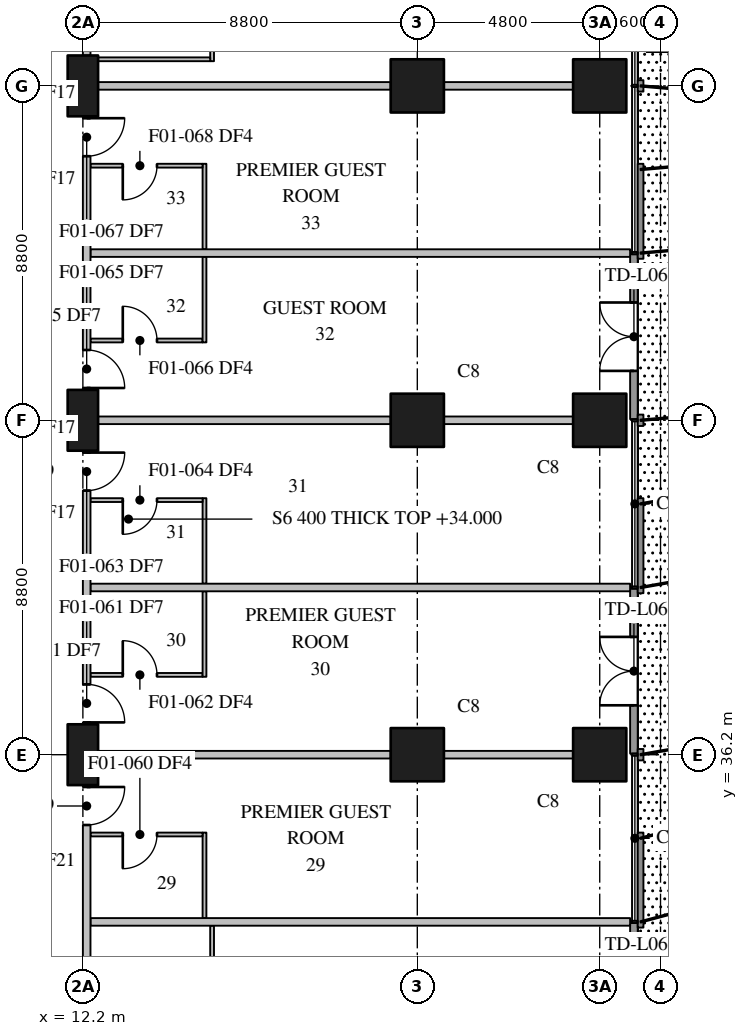
"""IFC4 building model, lengths in metres.
Left out: names, types, materials, properties, quantities, classifications, styles, units other than length and angle.
Written with IfcOpenShell. Run it as: python <this file> out.ifc"""

import sys

from ifc_helpers import new_model, si_unit, direction, frame, frame_2d, origin, origin_2d, place, context, subcontext, project, spatial, rectangle, extrude, element, fill, save


model = new_model("IFC4")
c1 = context("Model", 3, precision=1e-05, world=origin(), true_north=direction((0.0, 1.0)))
c2 = subcontext(c1, "Body", "Model", "MODEL_VIEW")
j1 = project(units=[si_unit("LENGTHUNIT", "METRE"), si_unit("PLANEANGLEUNIT", "RADIAN")], contexts=[c1])
p1 = place(None, origin())
s1 = spatial("IfcSite", under=j1, at=p1, CompositionType="ELEMENT")
p2 = place(p1, origin())
s2 = spatial("IfcBuilding", under=s1, at=p2, CompositionType="ELEMENT")
p3 = place(p2, frame((0.0, 0.0, 34.0)))
s3 = spatial("IfcBuildingStorey", under=s2, at=p3, CompositionType="ELEMENT", Elevation=34.0)
for number, where, z_axis, x_axis in (
    (1, (12.2, 36.2, 0.0), (0.0, 0.0, 1.0), (0.0, 1.0, 0.0)),
    (2, (12.2, 45.0, 0.0), (0.0, 0.0, 1.0), (0.0, 1.0, 0.0)),
    (3, (12.2, 53.8, 0.0), (0.0, 0.0, 1.0), (0.0, 1.0, 0.0)),
):
    element("IfcColumn", number, at=place(p3, frame(where, z_axis=z_axis, x_axis=x_axis)), inside=s3, PredefinedType="COLUMN", context=c2, shape_type="SweptSolid", body=[
        extrude(rectangle(XDim=1.6, YDim=0.8, at=origin_2d()), origin(), (0.0, 0.0, 1.0), 3.7),
    ])
for number, where, z_axis, x_axis in (
    (4, (21.0, 36.2, 0.0), (0.0, 0.0, 1.0), (1.0, 0.0, 0.0)),
    (5, (21.0, 45.0, 0.0), (0.0, 0.0, 1.0), (1.0, 0.0, 0.0)),
    (6, (21.0, 53.8, 0.0), (0.0, 0.0, 1.0), (1.0, 0.0, 0.0)),
    (7, (25.8, 36.2, 0.0), (0.0, 0.0, 1.0), (1.0, 0.0, 0.0)),
    (8, (25.8, 45.0, 0.0), (0.0, 0.0, 1.0), (1.0, 0.0, 0.0)),
    (9, (25.8, 53.8, 0.0), (0.0, 0.0, 1.0), (1.0, 0.0, 0.0)),
):
    element("IfcColumn", number, at=place(p3, frame(where, z_axis=z_axis, x_axis=x_axis)), inside=s3, PredefinedType="COLUMN", context=c2, shape_type="SweptSolid", body=[
        extrude(rectangle(XDim=1.4, YDim=1.4, at=origin_2d()), origin(), (0.0, 0.0, 1.0), 3.7),
    ])
p4 = place(p3, frame((26.7, 27.43, 0.0), z_axis=(0.0, 0.0, 1.0), x_axis=(0.0, 1.0, 0.0)))
e10 = element("IfcWall", 10, at=p4, inside=s3, PredefinedType="STANDARD", context=c2, shape_type="SweptSolid", body=[
    extrude(rectangle(XDim=4.34, YDim=0.2, at=frame_2d((2.17, 0.0))), origin(), (0.0, 0.0, 1.0), 3.4),
])
p5 = place(p4, frame((1.27, 0.0, 0.0)))
e11 = element("IfcOpeningElement", 11, at=p5, cuts=e10, PredefinedType="OPENING", context=c2, shape_type="SweptSolid", body=[
    extrude(rectangle(XDim=1.8, YDim=2.4, at=frame_2d((0.9, 1.2))), frame((0.0, 0.11, 0.0), z_axis=(0.0, -1.0, 0.0), x_axis=(1.0, 0.0, 0.0)), (0.0, 0.0, 1.0), 0.22),
])
p6 = place(p3, frame((26.7, 36.23, 0.0), z_axis=(0.0, 0.0, 1.0), x_axis=(0.0, 1.0, 0.0)))
e12 = element("IfcWall", 12, at=p6, inside=s3, PredefinedType="STANDARD", context=c2, shape_type="SweptSolid", body=[
    extrude(rectangle(XDim=4.34, YDim=0.2, at=frame_2d((2.17, 0.0))), origin(), (0.0, 0.0, 1.0), 3.4),
])
p7 = place(p6, frame((1.27, 0.0, 0.0)))
e13 = element("IfcOpeningElement", 13, at=p7, cuts=e12, PredefinedType="OPENING", context=c2, shape_type="SweptSolid", body=[
    extrude(rectangle(XDim=1.8, YDim=2.4, at=frame_2d((0.9, 1.2))), frame((0.0, 0.11, 0.0), z_axis=(0.0, -1.0, 0.0), x_axis=(1.0, 0.0, 0.0)), (0.0, 0.0, 1.0), 0.22),
])
p8 = place(p3, frame((26.7, 45.03, 0.0), z_axis=(0.0, 0.0, 1.0), x_axis=(0.0, 1.0, 0.0)))
e14 = element("IfcWall", 14, at=p8, inside=s3, PredefinedType="STANDARD", context=c2, shape_type="SweptSolid", body=[
    extrude(rectangle(XDim=4.34, YDim=0.2, at=frame_2d((2.17, 0.0))), origin(), (0.0, 0.0, 1.0), 3.4),
])
p9 = place(p8, frame((1.27, 0.0, 0.0)))
e15 = element("IfcOpeningElement", 15, at=p9, cuts=e14, PredefinedType="OPENING", context=c2, shape_type="SweptSolid", body=[
    extrude(rectangle(XDim=1.8, YDim=2.4, at=frame_2d((0.9, 1.2))), frame((0.0, 0.11, 0.0), z_axis=(0.0, -1.0, 0.0), x_axis=(1.0, 0.0, 0.0)), (0.0, 0.0, 1.0), 0.22),
])
p10 = place(p3, frame((12.6, 36.2, 0.0), z_axis=(0.0, 0.0, 1.0), x_axis=(1.0, 0.0, 0.0)))
e16 = element("IfcWall", 16, at=p10, inside=s3, PredefinedType="PARTITIONING", context=c2, shape_type="SweptSolid", body=[
    extrude(rectangle(XDim=7.7, YDim=0.2, at=frame_2d((3.85, 0.0))), origin(), (0.0, 0.0, 1.0), 3.4),
])
p11 = place(p3, frame((21.7, 36.2, 0.0), z_axis=(0.0, 0.0, 1.0), x_axis=(1.0, 0.0, 0.0)))
e17 = element("IfcWall", 17, at=p11, inside=s3, PredefinedType="PARTITIONING", context=c2, shape_type="SweptSolid", body=[
    extrude(rectangle(XDim=3.4, YDim=0.2, at=frame_2d((1.7, 0.0))), origin(), (0.0, 0.0, 1.0), 3.4),
])
p12 = place(p3, frame((12.4, 40.6, 0.0), z_axis=(0.0, 0.0, 1.0), x_axis=(1.0, 0.0, 0.0)))
e18 = element("IfcWall", 18, at=p12, inside=s3, PredefinedType="PARTITIONING", context=c2, shape_type="SweptSolid", body=[
    extrude(rectangle(XDim=14.2, YDim=0.2, at=frame_2d((7.1, 0.0))), origin(), (0.0, 0.0, 1.0), 3.4),
])
p13 = place(p3, frame((12.6, 45.0, 0.0), z_axis=(0.0, 0.0, 1.0), x_axis=(1.0, 0.0, 0.0)))
e19 = element("IfcWall", 19, at=p13, inside=s3, PredefinedType="PARTITIONING", context=c2, shape_type="SweptSolid", body=[
    extrude(rectangle(XDim=7.7, YDim=0.2, at=frame_2d((3.85, 0.0))), origin(), (0.0, 0.0, 1.0), 3.4),
])
p14 = place(p3, frame((21.7, 45.0, 0.0), z_axis=(0.0, 0.0, 1.0), x_axis=(1.0, 0.0, 0.0)))
e20 = element("IfcWall", 20, at=p14, inside=s3, PredefinedType="PARTITIONING", context=c2, shape_type="SweptSolid", body=[
    extrude(rectangle(XDim=3.4, YDim=0.2, at=frame_2d((1.7, 0.0))), origin(), (0.0, 0.0, 1.0), 3.4),
])
p15 = place(p3, frame((12.4, 49.4, 0.0), z_axis=(0.0, 0.0, 1.0), x_axis=(1.0, 0.0, 0.0)))
e21 = element("IfcWall", 21, at=p15, inside=s3, PredefinedType="PARTITIONING", context=c2, shape_type="SweptSolid", body=[
    extrude(rectangle(XDim=14.2, YDim=0.2, at=frame_2d((7.1, 0.0))), origin(), (0.0, 0.0, 1.0), 3.4),
])
p16 = place(p3, frame((12.6, 53.8, 0.0), z_axis=(0.0, 0.0, 1.0), x_axis=(1.0, 0.0, 0.0)))
e22 = element("IfcWall", 22, at=p16, inside=s3, PredefinedType="PARTITIONING", context=c2, shape_type="SweptSolid", body=[
    extrude(rectangle(XDim=7.7, YDim=0.2, at=frame_2d((3.85, 0.0))), origin(), (0.0, 0.0, 1.0), 3.4),
])
p17 = place(p3, frame((21.7, 53.8, 0.0), z_axis=(0.0, 0.0, 1.0), x_axis=(1.0, 0.0, 0.0)))
e23 = element("IfcWall", 23, at=p17, inside=s3, PredefinedType="PARTITIONING", context=c2, shape_type="SweptSolid", body=[
    extrude(rectangle(XDim=3.4, YDim=0.2, at=frame_2d((1.7, 0.0))), origin(), (0.0, 0.0, 1.0), 3.4),
])
p18 = place(p3, frame((12.3, 35.4, 0.0), z_axis=(0.0, 0.0, 1.0), x_axis=(0.0, -1.0, 0.0)))
e24 = element("IfcWall", 24, at=p18, inside=s3, PredefinedType="PARTITIONING", context=c2, shape_type="SweptSolid", body=[
    extrude(rectangle(XDim=7.2, YDim=0.2, at=frame_2d((3.6, 0.0))), origin(), (0.0, 0.0, 1.0), 3.4),
])
p19 = place(p18, frame((0.05, 0.0, 0.0)))
e25 = element("IfcOpeningElement", 25, at=p19, cuts=e24, PredefinedType="OPENING", context=c2, shape_type="SweptSolid", body=[
    extrude(rectangle(XDim=1.0, YDim=2.1, at=frame_2d((0.5, 1.05))), frame((0.0, 0.11, 0.0), z_axis=(0.0, -1.0, 0.0), x_axis=(1.0, 0.0, 0.0)), (0.0, 0.0, 1.0), 0.22),
])
p20 = place(p3, frame((12.3, 44.2, 0.0), z_axis=(0.0, 0.0, 1.0), x_axis=(0.0, -1.0, 0.0)))
e26 = element("IfcWall", 26, at=p20, inside=s3, PredefinedType="PARTITIONING", context=c2, shape_type="SweptSolid", body=[
    extrude(rectangle(XDim=7.2, YDim=0.2, at=frame_2d((3.6, 0.0))), origin(), (0.0, 0.0, 1.0), 3.4),
])
p21 = place(p20, frame((6.15, 0.0, 0.0)))
e27 = element("IfcOpeningElement", 27, at=p21, cuts=e26, PredefinedType="OPENING", context=c2, shape_type="SweptSolid", body=[
    extrude(rectangle(XDim=1.0, YDim=2.1, at=frame_2d((0.5, 1.05))), frame((0.0, 0.11, 0.0), z_axis=(0.0, -1.0, 0.0), x_axis=(1.0, 0.0, 0.0)), (0.0, 0.0, 1.0), 0.22),
])
p22 = place(p20, frame((0.05, 0.0, 0.0)))
e28 = element("IfcOpeningElement", 28, at=p22, cuts=e26, PredefinedType="OPENING", context=c2, shape_type="SweptSolid", body=[
    extrude(rectangle(XDim=1.0, YDim=2.1, at=frame_2d((0.5, 1.05))), frame((0.0, 0.11, 0.0), z_axis=(0.0, -1.0, 0.0), x_axis=(1.0, 0.0, 0.0)), (0.0, 0.0, 1.0), 0.22),
])
p23 = place(p3, frame((12.3, 53.0, 0.0), z_axis=(0.0, 0.0, 1.0), x_axis=(0.0, -1.0, 0.0)))
e29 = element("IfcWall", 29, at=p23, inside=s3, PredefinedType="PARTITIONING", context=c2, shape_type="SweptSolid", body=[
    extrude(rectangle(XDim=7.2, YDim=0.2, at=frame_2d((3.6, 0.0))), origin(), (0.0, 0.0, 1.0), 3.4),
])
p24 = place(p23, frame((6.15, 0.0, 0.0)))
e30 = element("IfcOpeningElement", 30, at=p24, cuts=e29, PredefinedType="OPENING", context=c2, shape_type="SweptSolid", body=[
    extrude(rectangle(XDim=1.0, YDim=2.1, at=frame_2d((0.5, 1.05))), frame((0.0, 0.11, 0.0), z_axis=(0.0, -1.0, 0.0), x_axis=(1.0, 0.0, 0.0)), (0.0, 0.0, 1.0), 0.22),
])
p25 = place(p23, frame((0.05, 0.0, 0.0)))
e31 = element("IfcOpeningElement", 31, at=p25, cuts=e29, PredefinedType="OPENING", context=c2, shape_type="SweptSolid", body=[
    extrude(rectangle(XDim=1.0, YDim=2.1, at=frame_2d((0.5, 1.05))), frame((0.0, 0.11, 0.0), z_axis=(0.0, -1.0, 0.0), x_axis=(1.0, 0.0, 0.0)), (0.0, 0.0, 1.0), 0.22),
])
p26 = place(p3, frame((12.3, 61.8, 0.0), z_axis=(0.0, 0.0, 1.0), x_axis=(0.0, -1.0, 0.0)))
e32 = element("IfcWall", 32, at=p26, inside=s3, PredefinedType="PARTITIONING", context=c2, shape_type="SweptSolid", body=[
    extrude(rectangle(XDim=7.2, YDim=0.2, at=frame_2d((3.6, 0.0))), origin(), (0.0, 0.0, 1.0), 3.4),
])
p27 = place(p26, frame((0.5, 0.0, 0.0)))
e33 = element("IfcOpeningElement", 33, at=p27, cuts=e32, PredefinedType="OPENING", context=c2, shape_type="SweptSolid", body=[
    extrude(rectangle(XDim=1.1, YDim=2.1, at=frame_2d((0.55, 1.05))), frame((0.0, 0.11, 0.0), z_axis=(0.0, -1.0, 0.0), x_axis=(1.0, 0.0, 0.0)), (0.0, 0.0, 1.0), 0.22),
])
p28 = place(p3, frame((12.4, 31.8, 0.0), z_axis=(0.0, 0.0, 1.0), x_axis=(1.0, 0.0, 0.0)))
e34 = element("IfcWall", 34, at=p28, inside=s3, PredefinedType="PARTITIONING", context=c2, shape_type="SweptSolid", body=[
    extrude(rectangle(XDim=14.2, YDim=0.2, at=frame_2d((7.1, 0.0))), origin(), (0.0, 0.0, 1.0), 3.4),
])
p29 = place(p3, frame((12.4, 38.3, 0.0), z_axis=(0.0, 0.0, 1.0), x_axis=(1.0, 0.0, 0.0)))
e35 = element("IfcWall", 35, at=p29, inside=s3, PredefinedType="PARTITIONING", context=c2, shape_type="SweptSolid", body=[
    extrude(rectangle(XDim=2.95, YDim=0.1, at=frame_2d((1.475, 0.0))), origin(), (0.0, 0.0, 1.0), 3.4),
])
p30 = place(p29, frame((0.85, 0.0, 0.0)))
e36 = element("IfcOpeningElement", 36, at=p30, cuts=e35, PredefinedType="OPENING", context=c2, shape_type="SweptSolid", body=[
    extrude(rectangle(XDim=0.9, YDim=2.1, at=frame_2d((0.45, 1.05))), frame((0.0, 0.06, 0.0), z_axis=(0.0, -1.0, 0.0), x_axis=(1.0, 0.0, 0.0)), (0.0, 0.0, 1.0), 0.12),
])
p31 = place(p3, frame((12.4, 47.1, 0.0), z_axis=(0.0, 0.0, 1.0), x_axis=(1.0, 0.0, 0.0)))
e37 = element("IfcWall", 37, at=p31, inside=s3, PredefinedType="PARTITIONING", context=c2, shape_type="SweptSolid", body=[
    extrude(rectangle(XDim=2.95, YDim=0.1, at=frame_2d((1.475, 0.0))), origin(), (0.0, 0.0, 1.0), 3.4),
])
p32 = place(p31, frame((0.85, 0.0, 0.0)))
e38 = element("IfcOpeningElement", 38, at=p32, cuts=e37, PredefinedType="OPENING", context=c2, shape_type="SweptSolid", body=[
    extrude(rectangle(XDim=0.9, YDim=2.1, at=frame_2d((0.45, 1.05))), frame((0.0, 0.06, 0.0), z_axis=(0.0, -1.0, 0.0), x_axis=(1.0, 0.0, 0.0)), (0.0, 0.0, 1.0), 0.12),
])
p33 = place(p3, frame((15.6, 28.15, 0.0), z_axis=(0.0, 0.0, 1.0), x_axis=(0.0, 1.0, 0.0)))
e39 = element("IfcWall", 39, at=p33, inside=s3, PredefinedType="PARTITIONING", context=c2, shape_type="SweptSolid", body=[
    extrude(rectangle(XDim=3.55, YDim=0.1, at=frame_2d((1.775, 0.0))), origin(), (0.0, 0.0, 1.0), 3.4),
])
p34 = place(p3, frame((15.6, 54.45, 0.0), z_axis=(0.0, 0.0, 1.0), x_axis=(0.0, 1.0, 0.0)))
e40 = element("IfcWall", 40, at=p34, inside=s3, PredefinedType="PARTITIONING", context=c2, shape_type="SweptSolid", body=[
    extrude(rectangle(XDim=3.7, YDim=0.1, at=frame_2d((1.85, 0.0))), origin(), (0.0, 0.0, 1.0), 3.4),
])
for number, where, z_axis, x_axis in (
    (41, (15.4, 31.9, 0.0), (0.0, 0.0, 1.0), (0.0, 1.0, 0.0)),
    (42, (15.4, 38.25, 0.0), (0.0, 0.0, 1.0), (0.0, 1.0, 0.0)),
    (43, (15.4, 40.7, 0.0), (0.0, 0.0, 1.0), (0.0, 1.0, 0.0)),
    (44, (15.4, 47.05, 0.0), (0.0, 0.0, 1.0), (0.0, 1.0, 0.0)),
    (45, (15.4, 49.5, 0.0), (0.0, 0.0, 1.0), (0.0, 1.0, 0.0)),
):
    element("IfcWall", number, at=place(p3, frame(where, z_axis=z_axis, x_axis=x_axis)), inside=s3, PredefinedType="PARTITIONING", context=c2, shape_type="SweptSolid", body=[
        extrude(rectangle(XDim=2.25, YDim=0.1, at=frame_2d((1.125, 0.0))), origin(), (0.0, 0.0, 1.0), 3.4),
    ])
p35 = place(p3, frame((15.35, 34.1, 0.0), z_axis=(0.0, 0.0, 1.0), x_axis=(-1.0, 0.0, 0.0)))
e46 = element("IfcWall", 46, at=p35, inside=s3, PredefinedType="PARTITIONING", context=c2, shape_type="SweptSolid", body=[
    extrude(rectangle(XDim=2.95, YDim=0.1, at=frame_2d((1.475, 0.0))), origin(), (0.0, 0.0, 1.0), 3.4),
])
p36 = place(p35, frame((1.2, 0.0, 0.0)))
e47 = element("IfcOpeningElement", 47, at=p36, cuts=e46, PredefinedType="OPENING", context=c2, shape_type="SweptSolid", body=[
    extrude(rectangle(XDim=0.9, YDim=2.1, at=frame_2d((0.45, 1.05))), frame((0.0, 0.06, 0.0), z_axis=(0.0, -1.0, 0.0), x_axis=(1.0, 0.0, 0.0)), (0.0, 0.0, 1.0), 0.12),
])
p37 = place(p3, frame((15.35, 42.9, 0.0), z_axis=(0.0, 0.0, 1.0), x_axis=(-1.0, 0.0, 0.0)))
e48 = element("IfcWall", 48, at=p37, inside=s3, PredefinedType="PARTITIONING", context=c2, shape_type="SweptSolid", body=[
    extrude(rectangle(XDim=2.95, YDim=0.1, at=frame_2d((1.475, 0.0))), origin(), (0.0, 0.0, 1.0), 3.4),
])
p38 = place(p37, frame((1.2, 0.0, 0.0)))
e49 = element("IfcOpeningElement", 49, at=p38, cuts=e48, PredefinedType="OPENING", context=c2, shape_type="SweptSolid", body=[
    extrude(rectangle(XDim=0.9, YDim=2.1, at=frame_2d((0.45, 1.05))), frame((0.0, 0.06, 0.0), z_axis=(0.0, -1.0, 0.0), x_axis=(1.0, 0.0, 0.0)), (0.0, 0.0, 1.0), 0.12),
])
p39 = place(p3, frame((15.35, 51.7, 0.0), z_axis=(0.0, 0.0, 1.0), x_axis=(-1.0, 0.0, 0.0)))
e50 = element("IfcWall", 50, at=p39, inside=s3, PredefinedType="PARTITIONING", context=c2, shape_type="SweptSolid", body=[
    extrude(rectangle(XDim=2.95, YDim=0.1, at=frame_2d((1.475, 0.0))), origin(), (0.0, 0.0, 1.0), 3.4),
])
p40 = place(p39, frame((1.2, 0.0, 0.0)))
e51 = element("IfcOpeningElement", 51, at=p40, cuts=e50, PredefinedType="OPENING", context=c2, shape_type="SweptSolid", body=[
    extrude(rectangle(XDim=0.9, YDim=2.1, at=frame_2d((0.45, 1.05))), frame((0.0, 0.06, 0.0), z_axis=(0.0, -1.0, 0.0), x_axis=(1.0, 0.0, 0.0)), (0.0, 0.0, 1.0), 0.12),
])
p41 = place(p3, frame((12.6, 54.5, 0.0), z_axis=(0.0, 0.0, 1.0), x_axis=(1.0, 0.0, 0.0)))
e52 = element("IfcWall", 52, at=p41, inside=s3, PredefinedType="PARTITIONING", context=c2, shape_type="SweptSolid", body=[
    extrude(rectangle(XDim=2.95, YDim=0.1, at=frame_2d((1.475, 0.0))), origin(), (0.0, 0.0, 1.0), 3.4),
])
p42 = place(p7, origin())
e53 = element("IfcDoor", 53, at=p42, inside=s3, OperationType="SINGLE_SWING_LEFT", PredefinedType="DOOR", context=c2, shape_type="SweptSolid", body=[
    extrude(rectangle(XDim=1.8, YDim=2.4, at=frame_2d((0.9, 1.2))), frame((0.0, 0.025, 0.0), z_axis=(0.0, -1.0, 0.0), x_axis=(1.0, 0.0, 0.0)), (0.0, 0.0, 1.0), 0.05),
])
fill(e13, e53)
p43 = place(p9, origin())
e54 = element("IfcDoor", 54, at=p43, inside=s3, OperationType="SINGLE_SWING_LEFT", PredefinedType="DOOR", context=c2, shape_type="SweptSolid", body=[
    extrude(rectangle(XDim=1.8, YDim=2.4, at=frame_2d((0.9, 1.2))), frame((0.0, 0.025, 0.0), z_axis=(0.0, -1.0, 0.0), x_axis=(1.0, 0.0, 0.0)), (0.0, 0.0, 1.0), 0.05),
])
fill(e15, e54)
p44 = place(p19, origin())
e55 = element("IfcDoor", 55, at=p44, inside=s3, OperationType="SINGLE_SWING_LEFT", PredefinedType="DOOR", context=c2, shape_type="SweptSolid", body=[
    extrude(rectangle(XDim=1.0, YDim=2.1, at=frame_2d((0.5, 1.05))), frame((0.0, 0.025, 0.0), z_axis=(0.0, -1.0, 0.0), x_axis=(1.0, 0.0, 0.0)), (0.0, 0.0, 1.0), 0.05),
])
fill(e25, e55)
p45 = place(p36, origin())
e56 = element("IfcDoor", 56, at=p45, inside=s3, OperationType="SINGLE_SWING_RIGHT", PredefinedType="DOOR", context=c2, shape_type="SweptSolid", body=[
    extrude(rectangle(XDim=0.9, YDim=2.1, at=frame_2d((0.45, 1.05))), frame((0.0, 0.025, 0.0), z_axis=(0.0, -1.0, 0.0), x_axis=(1.0, 0.0, 0.0)), (0.0, 0.0, 1.0), 0.05),
])
fill(e47, e56)
p46 = place(p21, origin())
e57 = element("IfcDoor", 57, at=p46, inside=s3, OperationType="SINGLE_SWING_RIGHT", PredefinedType="DOOR", context=c2, shape_type="SweptSolid", body=[
    extrude(rectangle(XDim=1.0, YDim=2.1, at=frame_2d((0.5, 1.05))), frame((0.0, 0.025, 0.0), z_axis=(0.0, -1.0, 0.0), x_axis=(1.0, 0.0, 0.0)), (0.0, 0.0, 1.0), 0.05),
])
fill(e27, e57)
p47 = place(p30, origin())
e58 = element("IfcDoor", 58, at=p47, inside=s3, OperationType="SINGLE_SWING_LEFT", PredefinedType="DOOR", context=c2, shape_type="SweptSolid", body=[
    extrude(rectangle(XDim=0.9, YDim=2.1, at=frame_2d((0.45, 1.05))), frame((0.0, 0.025, 0.0), z_axis=(0.0, -1.0, 0.0), x_axis=(1.0, 0.0, 0.0)), (0.0, 0.0, 1.0), 0.05),
])
fill(e36, e58)
p48 = place(p22, origin())
e59 = element("IfcDoor", 59, at=p48, inside=s3, OperationType="SINGLE_SWING_LEFT", PredefinedType="DOOR", context=c2, shape_type="SweptSolid", body=[
    extrude(rectangle(XDim=1.0, YDim=2.1, at=frame_2d((0.5, 1.05))), frame((0.0, 0.025, 0.0), z_axis=(0.0, -1.0, 0.0), x_axis=(1.0, 0.0, 0.0)), (0.0, 0.0, 1.0), 0.05),
])
fill(e28, e59)
p49 = place(p38, origin())
e60 = element("IfcDoor", 60, at=p49, inside=s3, OperationType="SINGLE_SWING_RIGHT", PredefinedType="DOOR", context=c2, shape_type="SweptSolid", body=[
    extrude(rectangle(XDim=0.9, YDim=2.1, at=frame_2d((0.45, 1.05))), frame((0.0, 0.025, 0.0), z_axis=(0.0, -1.0, 0.0), x_axis=(1.0, 0.0, 0.0)), (0.0, 0.0, 1.0), 0.05),
])
fill(e49, e60)
p50 = place(p24, origin())
e61 = element("IfcDoor", 61, at=p50, inside=s3, OperationType="SINGLE_SWING_RIGHT", PredefinedType="DOOR", context=c2, shape_type="SweptSolid", body=[
    extrude(rectangle(XDim=1.0, YDim=2.1, at=frame_2d((0.5, 1.05))), frame((0.0, 0.025, 0.0), z_axis=(0.0, -1.0, 0.0), x_axis=(1.0, 0.0, 0.0)), (0.0, 0.0, 1.0), 0.05),
])
fill(e30, e61)
p51 = place(p32, origin())
e62 = element("IfcDoor", 62, at=p51, inside=s3, OperationType="SINGLE_SWING_LEFT", PredefinedType="DOOR", context=c2, shape_type="SweptSolid", body=[
    extrude(rectangle(XDim=0.9, YDim=2.1, at=frame_2d((0.45, 1.05))), frame((0.0, 0.025, 0.0), z_axis=(0.0, -1.0, 0.0), x_axis=(1.0, 0.0, 0.0)), (0.0, 0.0, 1.0), 0.05),
])
fill(e38, e62)
p52 = place(p25, origin())
e63 = element("IfcDoor", 63, at=p52, inside=s3, OperationType="SINGLE_SWING_LEFT", PredefinedType="DOOR", context=c2, shape_type="SweptSolid", body=[
    extrude(rectangle(XDim=1.0, YDim=2.1, at=frame_2d((0.5, 1.05))), frame((0.0, 0.025, 0.0), z_axis=(0.0, -1.0, 0.0), x_axis=(1.0, 0.0, 0.0)), (0.0, 0.0, 1.0), 0.05),
])
fill(e31, e63)
p53 = place(p40, origin())
e64 = element("IfcDoor", 64, at=p53, inside=s3, OperationType="SINGLE_SWING_RIGHT", PredefinedType="DOOR", context=c2, shape_type="SweptSolid", body=[
    extrude(rectangle(XDim=0.9, YDim=2.1, at=frame_2d((0.45, 1.05))), frame((0.0, 0.025, 0.0), z_axis=(0.0, -1.0, 0.0), x_axis=(1.0, 0.0, 0.0)), (0.0, 0.0, 1.0), 0.05),
])
fill(e51, e64)
save(model, sys.argv[1])
